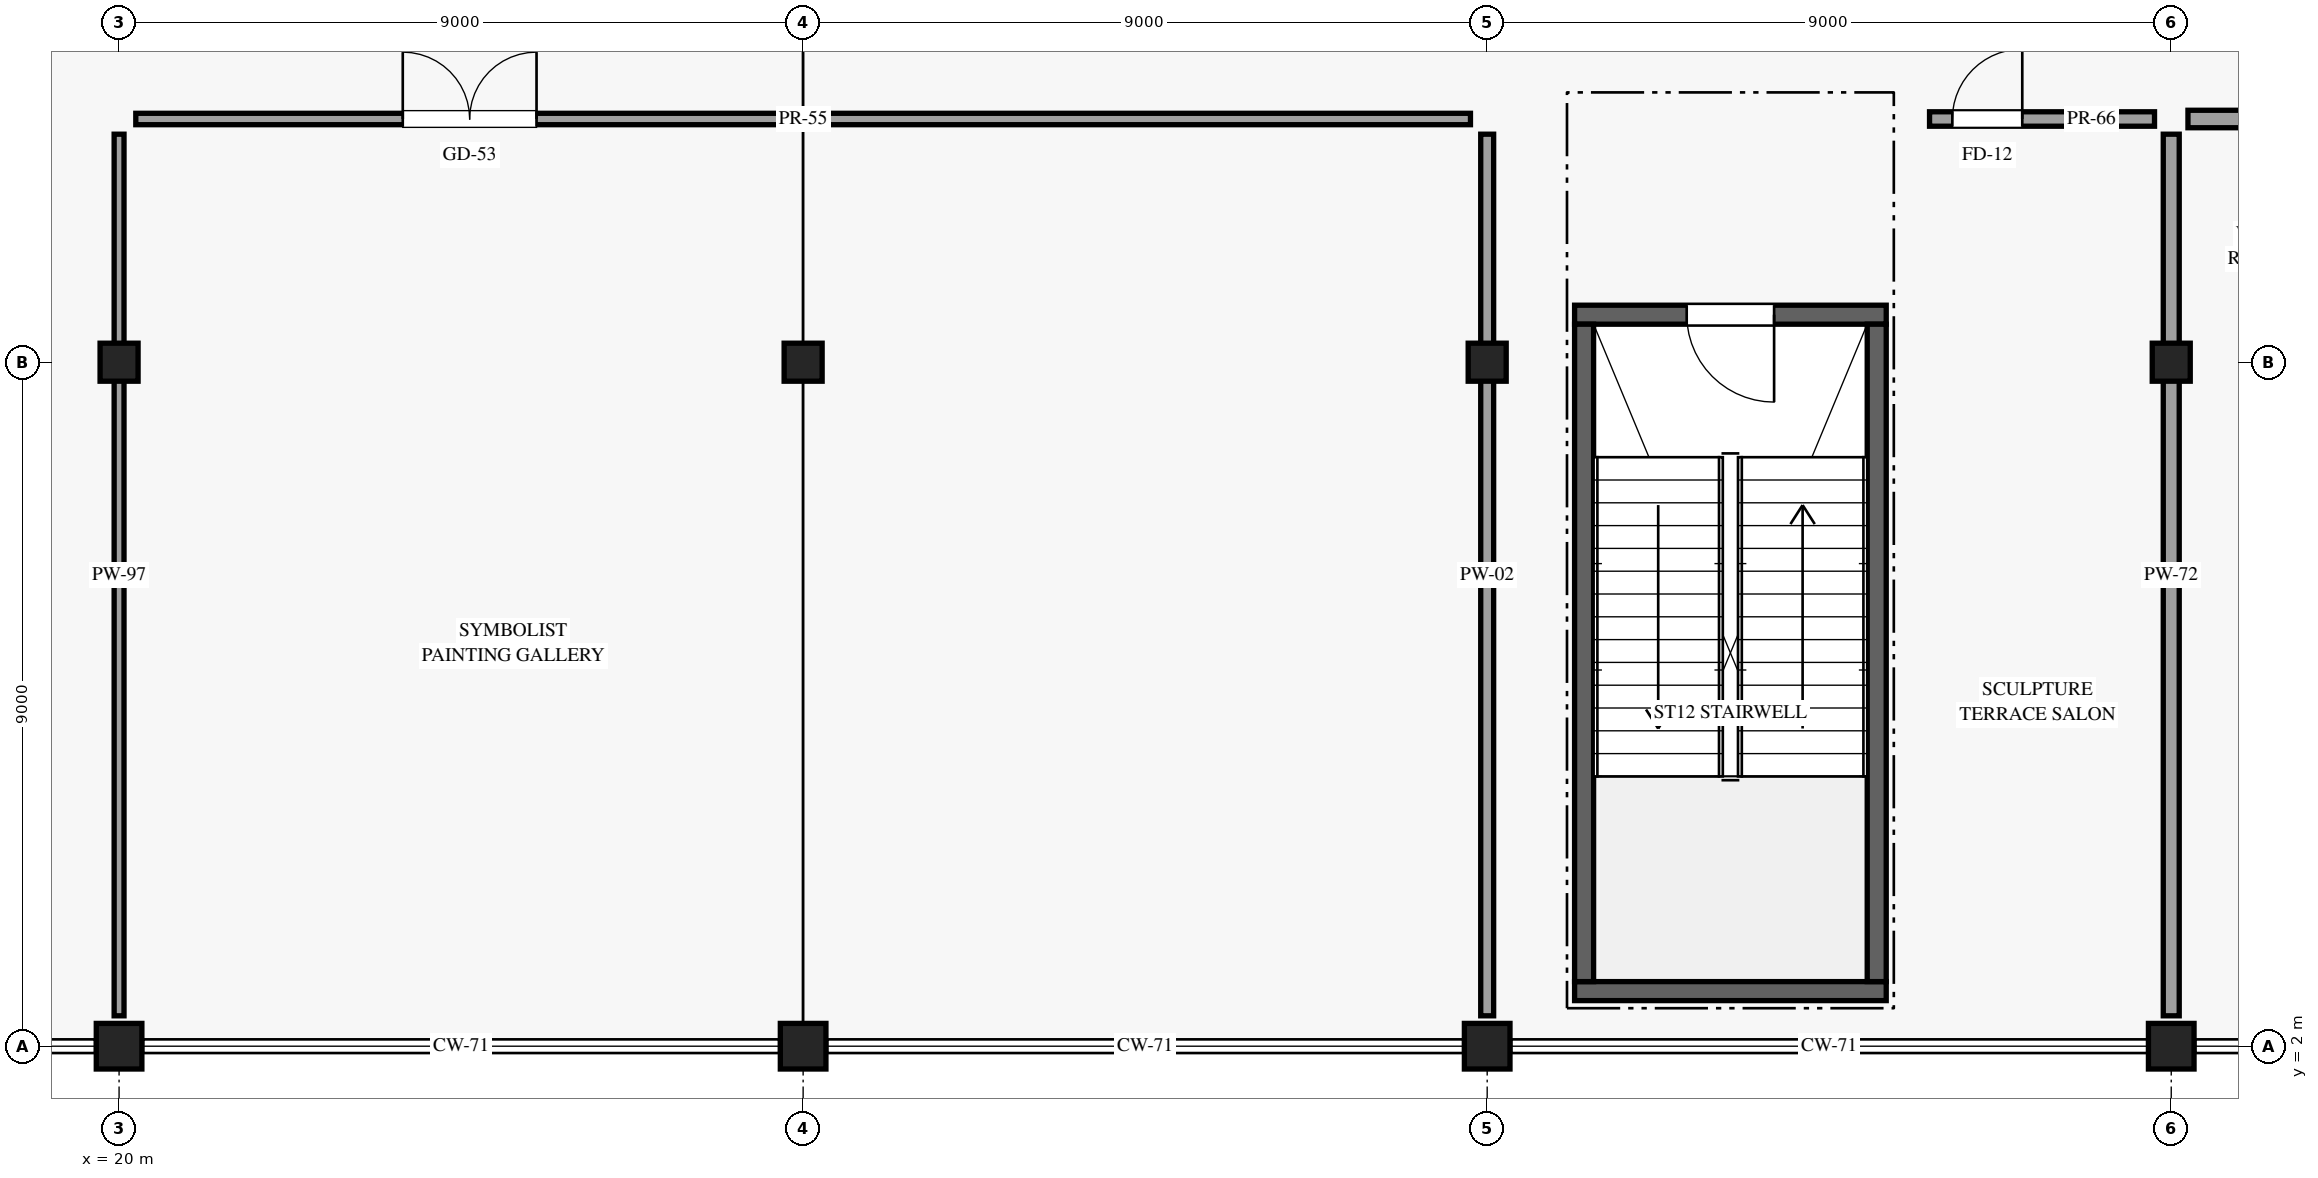
"""IFC4 building model, lengths in metres.
Left out: names, types, materials, properties, quantities, classifications, styles, units other than length and angle.
Written with IfcOpenShell. Run it as: python <this file> out.ifc"""

import sys

from ifc_helpers import new_model, si_unit, direction, frame, frame_2d, origin, origin_2d, place, context, subcontext, project, spatial, rectangle, extrude, element, fill, save


model = new_model("IFC4")
c1 = context("Model", 3, precision=1e-05, world=origin(), true_north=direction((0.0, 1.0)))
c2 = subcontext(c1, "Body", "Model", "MODEL_VIEW")
j1 = project(units=[si_unit("LENGTHUNIT", "METRE"), si_unit("PLANEANGLEUNIT", "RADIAN")], contexts=[c1])
p1 = place(None, origin())
s1 = spatial("IfcSite", under=j1, at=p1, CompositionType="ELEMENT")
p2 = place(p1, origin())
s2 = spatial("IfcBuilding", under=s1, at=p2, CompositionType="ELEMENT")
p3 = place(p2, frame((0.0, 0.0, 19.5)))
s3 = spatial("IfcBuildingStorey", under=s2, at=p3, CompositionType="ELEMENT", Elevation=19.5)
p4 = place(p3, frame((20.0, 2.0, 0.0), z_axis=(0.0, 0.0, 1.0), x_axis=(1.0, 0.0, 0.0)))
e1 = element("IfcColumn", 1, at=p4, inside=s3, PredefinedType="COLUMN", context=c2, shape_type="SweptSolid", body=[
    extrude(rectangle(XDim=0.6, YDim=0.6, at=origin_2d()), origin(), (0.0, 0.0, 1.0), 4.5),
])
p5 = place(p3, frame((20.0, 11.0, 0.0), z_axis=(0.0, 0.0, 1.0), x_axis=(1.0, 0.0, 0.0)))
e2 = element("IfcColumn", 2, at=p5, inside=s3, PredefinedType="COLUMN", context=c2, shape_type="SweptSolid", body=[
    extrude(rectangle(XDim=0.5, YDim=0.5, at=origin_2d()), origin(), (0.0, 0.0, 1.0), 4.5),
])
p6 = place(p3, frame((29.0, 2.0, 0.0), z_axis=(0.0, 0.0, 1.0), x_axis=(1.0, 0.0, 0.0)))
e3 = element("IfcColumn", 3, at=p6, inside=s3, PredefinedType="COLUMN", context=c2, shape_type="SweptSolid", body=[
    extrude(rectangle(XDim=0.6, YDim=0.6, at=origin_2d()), origin(), (0.0, 0.0, 1.0), 4.5),
])
p7 = place(p3, frame((29.0, 11.0, 0.0), z_axis=(0.0, 0.0, 1.0), x_axis=(1.0, 0.0, 0.0)))
e4 = element("IfcColumn", 4, at=p7, inside=s3, PredefinedType="COLUMN", context=c2, shape_type="SweptSolid", body=[
    extrude(rectangle(XDim=0.5, YDim=0.5, at=origin_2d()), origin(), (0.0, 0.0, 1.0), 4.5),
])
p8 = place(p3, frame((38.0, 2.0, 0.0), z_axis=(0.0, 0.0, 1.0), x_axis=(1.0, 0.0, 0.0)))
e5 = element("IfcColumn", 5, at=p8, inside=s3, PredefinedType="COLUMN", context=c2, shape_type="SweptSolid", body=[
    extrude(rectangle(XDim=0.6, YDim=0.6, at=origin_2d()), origin(), (0.0, 0.0, 1.0), 4.5),
])
p9 = place(p3, frame((38.0, 11.0, 0.0), z_axis=(0.0, 0.0, 1.0), x_axis=(1.0, 0.0, 0.0)))
e6 = element("IfcColumn", 6, at=p9, inside=s3, PredefinedType="COLUMN", context=c2, shape_type="SweptSolid", body=[
    extrude(rectangle(XDim=0.5, YDim=0.5, at=origin_2d()), origin(), (0.0, 0.0, 1.0), 4.5),
])
p10 = place(p3, frame((47.0, 2.0, 0.0), z_axis=(0.0, 0.0, 1.0), x_axis=(1.0, 0.0, 0.0)))
e7 = element("IfcColumn", 7, at=p10, inside=s3, PredefinedType="COLUMN", context=c2, shape_type="SweptSolid", body=[
    extrude(rectangle(XDim=0.6, YDim=0.6, at=origin_2d()), origin(), (0.0, 0.0, 1.0), 4.5),
])
p11 = place(p3, frame((47.0, 11.0, 0.0), z_axis=(0.0, 0.0, 1.0), x_axis=(1.0, 0.0, 0.0)))
e8 = element("IfcColumn", 8, at=p11, inside=s3, PredefinedType="COLUMN", context=c2, shape_type="SweptSolid", body=[
    extrude(rectangle(XDim=0.5, YDim=0.5, at=origin_2d()), origin(), (0.0, 0.0, 1.0), 4.5),
])
p12 = place(p3, frame((39.15, 11.625, 0.0), z_axis=(0.0, 0.0, 1.0), x_axis=(1.0, 0.0, 0.0)))
e9 = element("IfcWall", 9, at=p12, inside=s3, PredefinedType="SHEAR", context=c2, shape_type="SweptSolid", body=[
    extrude(rectangle(XDim=4.1, YDim=0.25, at=frame_2d((2.05, 0.0))), origin(), (0.0, 0.0, 1.0), 4.22),
])
p13 = place(p12, frame((2.625, 0.0, 0.0), z_axis=(0.0, 0.0, 1.0), x_axis=(-1.0, 0.0, 0.0)))
e10 = element("IfcOpeningElement", 10, at=p13, cuts=e9, PredefinedType="OPENING", context=c2, shape_type="SweptSolid", body=[
    extrude(rectangle(XDim=1.15, YDim=2.2, at=frame_2d((0.575, 1.1))), frame((0.0, 0.135, 0.0), z_axis=(0.0, -1.0, 0.0), x_axis=(1.0, 0.0, 0.0)), (0.0, 0.0, 1.0), 0.27),
])
p14 = place(p3, frame((39.15, 2.725, 0.0), z_axis=(0.0, 0.0, 1.0), x_axis=(1.0, 0.0, 0.0)))
e11 = element("IfcWall", 11, at=p14, inside=s3, PredefinedType="SHEAR", context=c2, shape_type="SweptSolid", body=[
    extrude(rectangle(XDim=4.1, YDim=0.25, at=frame_2d((2.05, 0.0))), origin(), (0.0, 0.0, 1.0), 4.22),
])
for number, where, z_axis, x_axis in (
    (12, (39.275, 2.85, 0.0), (0.0, 0.0, 1.0), (0.0, 1.0, 0.0)),
    (13, (43.125, 2.85, 0.0), (0.0, 0.0, 1.0), (0.0, 1.0, 0.0)),
):
    element("IfcWall", number, at=place(p3, frame(where, z_axis=z_axis, x_axis=x_axis)), inside=s3, PredefinedType="SHEAR", context=c2, shape_type="SweptSolid", body=[
        extrude(rectangle(XDim=8.65, YDim=0.25, at=frame_2d((4.325, 0.0))), origin(), (0.0, 0.0, 1.0), 4.22),
    ])
p15 = place(p3, frame((20.0, 2.4, 0.0), z_axis=(0.0, 0.0, 1.0), x_axis=(0.0, 1.0, 0.0)))
e14 = element("IfcWall", 14, at=p15, inside=s3, PredefinedType="PARTITIONING", context=c2, shape_type="SweptSolid", body=[
    extrude(rectangle(XDim=11.6, YDim=0.13, at=frame_2d((5.8, 0.0))), origin(), (0.0, 0.0, 1.0), 3.715),
])
p16 = place(p3, frame((20.22, 14.2, 0.0), z_axis=(0.0, 0.0, 1.0), x_axis=(1.0, 0.0, 0.0)))
e15 = element("IfcWall", 15, at=p16, inside=s3, PredefinedType="PARTITIONING", context=c2, shape_type="SweptSolid", body=[
    extrude(rectangle(XDim=17.56, YDim=0.15, at=frame_2d((8.78, 0.0))), origin(), (0.0, 0.0, 1.0), 3.715),
])
p17 = place(p16, frame((3.512, 0.0, 0.0)))
e16 = element("IfcOpeningElement", 16, at=p17, cuts=e15, PredefinedType="OPENING", context=c2, shape_type="SweptSolid", body=[
    extrude(rectangle(XDim=1.76, YDim=2.45, at=frame_2d((0.88, 1.225))), frame((0.0, 0.085, 0.0), z_axis=(0.0, -1.0, 0.0), x_axis=(1.0, 0.0, 0.0)), (0.0, 0.0, 1.0), 0.17),
])
p18 = place(p3, frame((38.0, 2.4, 0.0), z_axis=(0.0, 0.0, 1.0), x_axis=(0.0, 1.0, 0.0)))
e17 = element("IfcWall", 17, at=p18, inside=s3, PredefinedType="PARTITIONING", context=c2, shape_type="SweptSolid", body=[
    extrude(rectangle(XDim=11.6, YDim=0.17, at=frame_2d((5.8, 0.0))), origin(), (0.0, 0.0, 1.0), 3.715),
])
p19 = place(p3, frame((43.82, 14.2, 0.0), z_axis=(0.0, 0.0, 1.0), x_axis=(1.0, 0.0, 0.0)))
e18 = element("IfcWall", 18, at=p19, inside=s3, PredefinedType="PARTITIONING", context=c2, shape_type="SweptSolid", body=[
    extrude(rectangle(XDim=2.96, YDim=0.19, at=frame_2d((1.48, 0.0))), origin(), (0.0, 0.0, 1.0), 3.715),
])
p20 = place(p19, frame((0.3, 0.0, 0.0)))
e19 = element("IfcOpeningElement", 19, at=p20, cuts=e18, PredefinedType="OPENING", context=c2, shape_type="SweptSolid", body=[
    extrude(rectangle(XDim=0.92, YDim=2.12, at=frame_2d((0.46, 1.06))), frame((0.0, 0.105, 0.0), z_axis=(0.0, -1.0, 0.0), x_axis=(1.0, 0.0, 0.0)), (0.0, 0.0, 1.0), 0.21),
])
p21 = place(p3, frame((47.0, 2.4, 0.0), z_axis=(0.0, 0.0, 1.0), x_axis=(0.0, 1.0, 0.0)))
e20 = element("IfcWall", 20, at=p21, inside=s3, PredefinedType="PARTITIONING", context=c2, shape_type="SweptSolid", body=[
    extrude(rectangle(XDim=11.6, YDim=0.21, at=frame_2d((5.8, 0.0))), origin(), (0.0, 0.0, 1.0), 3.715),
])
p22 = place(p3, frame((47.22, 14.2, 0.0), z_axis=(0.0, 0.0, 1.0), x_axis=(1.0, 0.0, 0.0)))
e21 = element("IfcWall", 21, at=p22, inside=s3, PredefinedType="PARTITIONING", context=c2, shape_type="SweptSolid", body=[
    extrude(rectangle(XDim=17.24, YDim=0.23, at=frame_2d((8.62, 0.0))), origin(), (0.0, 0.0, 1.0), 3.715),
])
p23 = place(p22, frame((3.53, 0.0, 0.0)))
e22 = element("IfcOpeningElement", 22, at=p23, cuts=e21, PredefinedType="OPENING", context=c2, shape_type="SweptSolid", body=[
    extrude(rectangle(XDim=1.5, YDim=2.35, at=frame_2d((0.75, 1.175))), frame((0.0, 0.125, 0.0), z_axis=(0.0, -1.0, 0.0), x_axis=(1.0, 0.0, 0.0)), (0.0, 0.0, 1.0), 0.25),
])
p24 = place(p13, origin())
e23 = element("IfcDoor", 23, at=p24, inside=s3, OperationType="SINGLE_SWING_LEFT", PredefinedType="DOOR", context=c2, shape_type="SweptSolid", body=[
    extrude(rectangle(XDim=1.15, YDim=2.2, at=frame_2d((0.575, 1.1))), frame((0.0, 0.025, 0.0), z_axis=(0.0, -1.0, 0.0), x_axis=(1.0, 0.0, 0.0)), (0.0, 0.0, 1.0), 0.05),
])
fill(e10, e23)
p25 = place(p17, origin())
e24 = element("IfcDoor", 24, at=p25, inside=s3, OperationType="DOUBLE_DOOR_SINGLE_SWING", PredefinedType="DOOR", context=c2, shape_type="SweptSolid", body=[
    extrude(rectangle(XDim=1.76, YDim=2.45, at=frame_2d((0.88, 1.225))), frame((0.0, 0.025, 0.0), z_axis=(0.0, -1.0, 0.0), x_axis=(1.0, 0.0, 0.0)), (0.0, 0.0, 1.0), 0.05),
])
fill(e16, e24)
p26 = place(p20, origin())
e25 = element("IfcDoor", 25, at=p26, inside=s3, OperationType="SINGLE_SWING_RIGHT", PredefinedType="DOOR", context=c2, shape_type="SweptSolid", body=[
    extrude(rectangle(XDim=0.92, YDim=2.12, at=frame_2d((0.46, 1.06))), frame((0.0, 0.025, 0.0), z_axis=(0.0, -1.0, 0.0), x_axis=(1.0, 0.0, 0.0)), (0.0, 0.0, 1.0), 0.05),
])
fill(e19, e25)
save(model, sys.argv[1])
